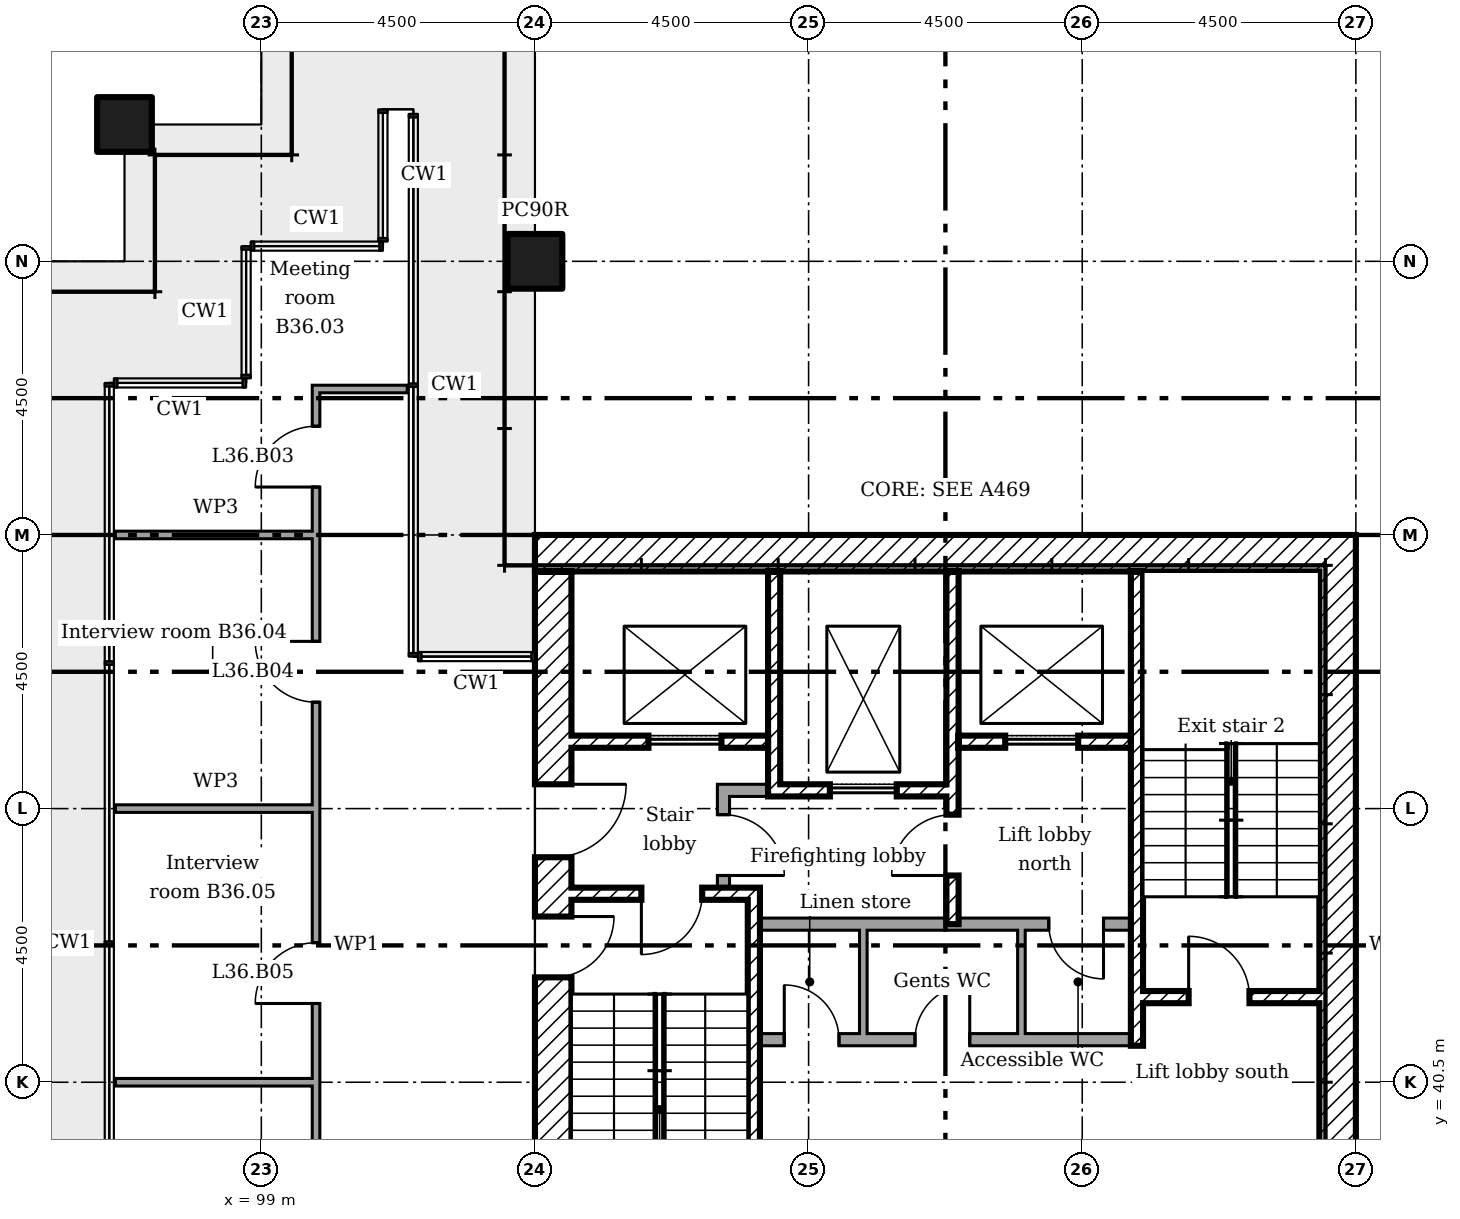
"""IFC4 building model, lengths in metres.
Left out: names, types, materials, properties, quantities, classifications, styles, units other than length and angle.
Written with IfcOpenShell. Run it as: python <this file> out.ifc"""

import sys

from ifc_helpers import new_model, si_unit, direction, frame, frame_2d, origin, origin_2d, place, context, subcontext, project, spatial, rectangle, extrude, element, fill, save


model = new_model("IFC4")
c1 = context("Model", 3, precision=1e-05, world=origin(), true_north=direction((0.0, 1.0)))
c2 = subcontext(c1, "Body", "Model", "MODEL_VIEW")
j1 = project(units=[si_unit("LENGTHUNIT", "METRE"), si_unit("PLANEANGLEUNIT", "RADIAN")], contexts=[c1])
p1 = place(None, origin())
s1 = spatial("IfcSite", under=j1, at=p1, CompositionType="ELEMENT")
p2 = place(p1, origin())
s2 = spatial("IfcBuilding", under=s1, at=p2, CompositionType="ELEMENT")
p3 = place(p2, frame((0.0, 0.0, 147.4)))
s3 = spatial("IfcBuildingStorey", under=s2, at=p3, CompositionType="ELEMENT", Elevation=147.4)
for number, where in (
    (1, (103.5, 54.0, 0.0)),
    (2, (96.75, 56.25, 0.0)),
):
    element("IfcColumn", number, at=place(p3, frame(where)), inside=s3, PredefinedType="COLUMN", context=c2, shape_type="SweptSolid", body=[
        extrude(rectangle(XDim=0.9, YDim=0.9, at=origin_2d()), origin(), (0.0, 0.0, 1.0), 3.6),
    ])
p4 = place(p3, frame((116.7, 36.0, 0.0), z_axis=(0.0, 0.0, 1.0), x_axis=(0.0, 1.0, 0.0)))
e3 = element("IfcWall", 3, at=p4, inside=s3, PredefinedType="SHEAR", context=c2, shape_type="SweptSolid", body=[
    extrude(rectangle(XDim=13.5, YDim=0.6, at=frame_2d((6.75, 0.0))), origin(), (0.0, 0.0, 1.0), 3.35),
])
p5 = place(p3, frame((103.5, 49.2, 0.0)))
e4 = element("IfcWall", 4, at=p5, inside=s3, PredefinedType="SHEAR", context=c2, shape_type="SweptSolid", body=[
    extrude(rectangle(XDim=12.9, YDim=0.6, at=frame_2d((6.45, 0.0))), origin(), (0.0, 0.0, 1.0), 3.35),
])
p6 = place(p3, frame((103.8, 36.6, 0.0), z_axis=(0.0, 0.0, 1.0), x_axis=(0.0, 1.0, 0.0)))
e5 = element("IfcWall", 5, at=p6, inside=s3, PredefinedType="SHEAR", context=c2, shape_type="SweptSolid", body=[
    extrude(rectangle(XDim=12.3, YDim=0.6, at=frame_2d((6.15, 0.0))), origin(), (0.0, 0.0, 1.0), 3.35),
])
p7 = place(p6, frame((7.6, 0.0, 0.0)))
e6 = element("IfcOpeningElement", 6, at=p7, cuts=e5, PredefinedType="OPENING", context=c2, shape_type="SweptSolid", body=[
    extrude(rectangle(XDim=1.2, YDim=2.1, at=frame_2d((0.6, 1.05))), frame((0.0, 0.31, 0.0), z_axis=(0.0, -1.0, 0.0), x_axis=(1.0, 0.0, 0.0)), (0.0, 0.0, 1.0), 0.62),
])
p8 = place(p6, frame((5.625, 0.0, 0.0)))
e7 = element("IfcOpeningElement", 7, at=p8, cuts=e5, PredefinedType="OPENING", context=c2, shape_type="SweptSolid", body=[
    extrude(rectangle(XDim=1.0, YDim=2.1, at=frame_2d((0.5, 1.05))), frame((0.0, 0.31, 0.0), z_axis=(0.0, -1.0, 0.0), x_axis=(1.0, 0.0, 0.0)), (0.0, 0.0, 1.0), 0.62),
])
p9 = place(p3, frame((107.433, 48.9, 0.0), z_axis=(0.0, 0.0, 1.0), x_axis=(0.0, -1.0, 0.0)))
e8 = element("IfcWall", 8, at=p9, inside=s3, PredefinedType="SHEAR", context=c2, shape_type="SweptSolid", body=[
    extrude(rectangle(XDim=3.7, YDim=0.2, at=frame_2d((1.85, 0.0))), origin(), (0.0, 0.0, 1.0), 3.35),
])
p10 = place(p3, frame((110.367, 48.9, 0.0), z_axis=(0.0, 0.0, 1.0), x_axis=(0.0, -1.0, 0.0)))
e9 = element("IfcWall", 9, at=p10, inside=s3, PredefinedType="SHEAR", context=c2, shape_type="SweptSolid", body=[
    extrude(rectangle(XDim=5.8, YDim=0.2, at=frame_2d((2.9, 0.0))), origin(), (0.0, 0.0, 1.0), 3.35),
])
p11 = place(p10, frame((4.0, 0.0, 0.0)))
e10 = element("IfcOpeningElement", 10, at=p11, cuts=e9, PredefinedType="OPENING", context=c2, shape_type="SweptSolid", body=[
    extrude(rectangle(XDim=1.0, YDim=2.1, at=frame_2d((0.5, 1.05))), frame((0.0, 0.11, 0.0), z_axis=(0.0, -1.0, 0.0), x_axis=(1.0, 0.0, 0.0)), (0.0, 0.0, 1.0), 0.22),
])
p12 = place(p3, frame((106.5, 45.3, 0.0)))
e11 = element("IfcWall", 11, at=p12, inside=s3, PredefinedType="PARTITIONING", context=c2, shape_type="SweptSolid", body=[
    extrude(rectangle(XDim=0.833, YDim=0.2, at=frame_2d((0.417, 0.0))), origin(), (0.0, 0.0, 1.0), 3.35),
])
p13 = place(p3, frame((106.6, 43.7, 0.0), z_axis=(0.0, 0.0, 1.0), x_axis=(0.0, 1.0, 0.0)))
e12 = element("IfcWall", 12, at=p13, inside=s3, PredefinedType="PARTITIONING", context=c2, shape_type="SweptSolid", body=[
    extrude(rectangle(XDim=1.5, YDim=0.2, at=frame_2d((0.75, 0.0))), origin(), (0.0, 0.0, 1.0), 3.35),
])
p14 = place(p13, frame((0.2, 0.0, 0.0)))
e13 = element("IfcOpeningElement", 13, at=p14, cuts=e12, PredefinedType="OPENING", context=c2, shape_type="SweptSolid", body=[
    extrude(rectangle(XDim=1.0, YDim=2.1, at=frame_2d((0.5, 1.05))), frame((0.0, 0.11, 0.0), z_axis=(0.0, -1.0, 0.0), x_axis=(1.0, 0.0, 0.0)), (0.0, 0.0, 1.0), 0.22),
])
p15 = place(p3, frame((104.1, 46.1, 0.0)))
e14 = element("IfcWall", 14, at=p15, inside=s3, PredefinedType="SHEAR", context=c2, shape_type="SweptSolid", body=[
    extrude(rectangle(XDim=3.233, YDim=0.2, at=frame_2d((1.617, 0.0))), origin(), (0.0, 0.0, 1.0), 3.35),
])
p16 = place(p15, frame((1.267, 0.0, 0.0)))
e15 = element("IfcOpeningElement", 15, at=p16, cuts=e14, PredefinedType="OPENING", context=c2, shape_type="SweptSolid", body=[
    extrude(rectangle(XDim=1.2, YDim=2.1, at=frame_2d((0.6, 1.05))), frame((0.0, 0.11, 0.0), z_axis=(0.0, -1.0, 0.0), x_axis=(1.0, 0.0, 0.0)), (0.0, 0.0, 1.0), 0.22),
])
p17 = place(p3, frame((110.467, 46.1, 0.0)))
e16 = element("IfcWall", 16, at=p17, inside=s3, PredefinedType="SHEAR", context=c2, shape_type="SweptSolid", body=[
    extrude(rectangle(XDim=2.833, YDim=0.2, at=frame_2d((1.417, 0.0))), origin(), (0.0, 0.0, 1.0), 3.35),
])
p18 = place(p17, frame((0.767, 0.0, 0.0)))
e17 = element("IfcOpeningElement", 17, at=p18, cuts=e16, PredefinedType="OPENING", context=c2, shape_type="SweptSolid", body=[
    extrude(rectangle(XDim=1.2, YDim=2.1, at=frame_2d((0.6, 1.05))), frame((0.0, 0.11, 0.0), z_axis=(0.0, -1.0, 0.0), x_axis=(1.0, 0.0, 0.0)), (0.0, 0.0, 1.0), 0.22),
])
p19 = place(p3, frame((107.533, 45.3, 0.0)))
e18 = element("IfcWall", 18, at=p19, inside=s3, PredefinedType="SHEAR", context=c2, shape_type="SweptSolid", body=[
    extrude(rectangle(XDim=2.733, YDim=0.2, at=frame_2d((1.367, 0.0))), origin(), (0.0, 0.0, 1.0), 3.35),
])
p20 = place(p19, frame((0.817, 0.0, 0.0)))
e19 = element("IfcOpeningElement", 19, at=p20, cuts=e18, PredefinedType="OPENING", context=c2, shape_type="SweptSolid", body=[
    extrude(rectangle(XDim=1.1, YDim=2.1, at=frame_2d((0.55, 1.05))), frame((0.0, 0.11, 0.0), z_axis=(0.0, -1.0, 0.0), x_axis=(1.0, 0.0, 0.0)), (0.0, 0.0, 1.0), 0.22),
])
p21 = place(p3, frame((107.1, 36.6, 0.0), z_axis=(0.0, 0.0, 1.0), x_axis=(0.0, 1.0, 0.0)))
e20 = element("IfcWall", 20, at=p21, inside=s3, PredefinedType="SHEAR", context=c2, shape_type="SweptSolid", body=[
    extrude(rectangle(XDim=7.1, YDim=0.2, at=frame_2d((3.55, 0.0))), origin(), (0.0, 0.0, 1.0), 3.35),
])
p22 = place(p3, frame((104.1, 43.6, 0.0)))
e21 = element("IfcWall", 21, at=p22, inside=s3, PredefinedType="SHEAR", context=c2, shape_type="SweptSolid", body=[
    extrude(rectangle(XDim=2.9, YDim=0.2, at=frame_2d((1.45, 0.0))), origin(), (0.0, 0.0, 1.0), 3.35),
])
p23 = place(p22, frame((1.15, 0.0, 0.0)))
e22 = element("IfcOpeningElement", 22, at=p23, cuts=e21, PredefinedType="OPENING", context=c2, shape_type="SweptSolid", body=[
    extrude(rectangle(XDim=1.0, YDim=2.1, at=frame_2d((0.5, 1.05))), frame((0.0, 0.11, 0.0), z_axis=(0.0, -1.0, 0.0), x_axis=(1.0, 0.0, 0.0)), (0.0, 0.0, 1.0), 0.22),
])
p24 = place(p3, frame((113.5, 41.9, 0.0)))
e23 = element("IfcWall", 23, at=p24, inside=s3, PredefinedType="SHEAR", context=c2, shape_type="SweptSolid", body=[
    extrude(rectangle(XDim=2.9, YDim=0.2, at=frame_2d((1.45, 0.0))), origin(), (0.0, 0.0, 1.0), 3.35),
])
p25 = place(p24, frame((0.75, 0.0, 0.0)))
e24 = element("IfcOpeningElement", 24, at=p25, cuts=e23, PredefinedType="OPENING", context=c2, shape_type="SweptSolid", body=[
    extrude(rectangle(XDim=1.0, YDim=2.1, at=frame_2d((0.5, 1.05))), frame((0.0, 0.11, 0.0), z_axis=(0.0, -1.0, 0.0), x_axis=(1.0, 0.0, 0.0)), (0.0, 0.0, 1.0), 0.22),
])
p26 = place(p3, frame((113.4, 41.1, 0.0), z_axis=(0.0, 0.0, 1.0), x_axis=(0.0, 1.0, 0.0)))
e25 = element("IfcWall", 25, at=p26, inside=s3, PredefinedType="SHEAR", context=c2, shape_type="SweptSolid", body=[
    extrude(rectangle(XDim=7.8, YDim=0.2, at=frame_2d((3.9, 0.0))), origin(), (0.0, 0.0, 1.0), 3.35),
])
p27 = place(p3, frame((107.2, 43.1, 0.0)))
e26 = element("IfcWall", 26, at=p27, inside=s3, PredefinedType="PARTITIONING", context=c2, shape_type="SweptSolid", body=[
    extrude(rectangle(XDim=6.1, YDim=0.2, at=frame_2d((3.05, 0.0))), origin(), (0.0, 0.0, 1.0), 3.35),
])
p28 = place(p27, frame((4.75, 0.0, 0.0)))
e27 = element("IfcOpeningElement", 27, at=p28, cuts=e26, PredefinedType="OPENING", context=c2, shape_type="SweptSolid", body=[
    extrude(rectangle(XDim=0.9, YDim=2.1, at=frame_2d((0.45, 1.05))), frame((0.0, 0.11, 0.0), z_axis=(0.0, -1.0, 0.0), x_axis=(1.0, 0.0, 0.0)), (0.0, 0.0, 1.0), 0.22),
])
p29 = place(p3, frame((107.2, 41.2, 0.0)))
e28 = element("IfcWall", 28, at=p29, inside=s3, PredefinedType="PARTITIONING", context=c2, shape_type="SweptSolid", body=[
    extrude(rectangle(XDim=6.1, YDim=0.2, at=frame_2d((3.05, 0.0))), origin(), (0.0, 0.0, 1.0), 3.35),
])
p30 = place(p29, frame((0.4, 0.0, 0.0)))
e29 = element("IfcOpeningElement", 29, at=p30, cuts=e28, PredefinedType="OPENING", context=c2, shape_type="SweptSolid", body=[
    extrude(rectangle(XDim=0.9, YDim=2.1, at=frame_2d((0.45, 1.05))), frame((0.0, 0.11, 0.0), z_axis=(0.0, -1.0, 0.0), x_axis=(1.0, 0.0, 0.0)), (0.0, 0.0, 1.0), 0.22),
])
p31 = place(p29, frame((2.55, 0.0, 0.0)))
e30 = element("IfcOpeningElement", 30, at=p31, cuts=e28, PredefinedType="OPENING", context=c2, shape_type="SweptSolid", body=[
    extrude(rectangle(XDim=0.9, YDim=2.1, at=frame_2d((0.45, 1.05))), frame((0.0, 0.11, 0.0), z_axis=(0.0, -1.0, 0.0), x_axis=(1.0, 0.0, 0.0)), (0.0, 0.0, 1.0), 0.22),
])
for number, where, z_axis, x_axis in (
    (31, (108.9, 41.3, 0.0), (0.0, 0.0, 1.0), (0.0, 1.0, 0.0)),
    (32, (111.5, 41.3, 0.0), (0.0, 0.0, 1.0), (0.0, 1.0, 0.0)),
):
    element("IfcWall", number, at=place(p3, frame(where, z_axis=z_axis, x_axis=x_axis)), inside=s3, PredefinedType="PARTITIONING", context=c2, shape_type="SweptSolid", body=[
        extrude(rectangle(XDim=1.7, YDim=0.125, at=frame_2d((0.85, 0.0))), origin(), (0.0, 0.0, 1.0), 3.35),
    ])
p32 = place(p3, frame((96.6, 40.5, 0.0)))
e33 = element("IfcWall", 33, at=p32, inside=s3, PredefinedType="PARTITIONING", context=c2, shape_type="SweptSolid", body=[
    extrude(rectangle(XDim=3.3, YDim=0.125, at=frame_2d((1.65, 0.0))), origin(), (0.0, 0.0, 1.0), 2.851),
])
for number, where in (
    (34, (96.6, 45.0, 0.0)),
    (35, (96.6, 49.5, 0.0)),
):
    element("IfcWall", number, at=place(p3, frame(where)), inside=s3, PredefinedType="MOVABLE", context=c2, shape_type="SweptSolid", body=[
        extrude(rectangle(XDim=3.3, YDim=0.125, at=frame_2d((1.65, 0.0))), origin(), (0.0, 0.0, 1.0), 2.851),
    ])
p33 = place(p3, frame((99.837, 51.9, 0.0)))
e36 = element("IfcWall", 36, at=p33, inside=s3, PredefinedType="PARTITIONING", context=c2, shape_type="SweptSolid", body=[
    extrude(rectangle(XDim=1.562, YDim=0.125, at=frame_2d((0.781, 0.0))), origin(), (0.0, 0.0, 1.0), 3.45),
])
p34 = place(p3, frame((99.9, 33.663, 0.0), z_axis=(0.0, 0.0, 1.0), x_axis=(0.0, 1.0, 0.0)))
e37 = element("IfcWall", 37, at=p34, inside=s3, PredefinedType="PARTITIONING", context=c2, shape_type="SweptSolid", body=[
    extrude(rectangle(XDim=18.175, YDim=0.125, at=frame_2d((9.087, 0.0))), origin(), (0.0, 0.0, 1.0), 3.45),
])
p35 = place(p34, frame((16.625, 0.0, 0.0)))
e38 = element("IfcOpeningElement", 38, at=p35, cuts=e37, PredefinedType="OPENING", context=c2, shape_type="SweptSolid", body=[
    extrude(rectangle(XDim=1.0, YDim=2.1, at=frame_2d((0.5, 1.05))), frame((0.0, 0.073, 0.0), z_axis=(0.0, -1.0, 0.0), x_axis=(1.0, 0.0, 0.0)), (0.0, 0.0, 1.0), 0.145),
])
p36 = place(p34, frame((13.087, 0.0, 0.0)))
e39 = element("IfcOpeningElement", 39, at=p36, cuts=e37, PredefinedType="OPENING", context=c2, shape_type="SweptSolid", body=[
    extrude(rectangle(XDim=1.0, YDim=2.1, at=frame_2d((0.5, 1.05))), frame((0.0, 0.073, 0.0), z_axis=(0.0, -1.0, 0.0), x_axis=(1.0, 0.0, 0.0)), (0.0, 0.0, 1.0), 0.145),
])
p37 = place(p34, frame((8.133, 0.0, 0.0)))
e40 = element("IfcOpeningElement", 40, at=p37, cuts=e37, PredefinedType="OPENING", context=c2, shape_type="SweptSolid", body=[
    extrude(rectangle(XDim=1.0, YDim=2.1, at=frame_2d((0.5, 1.05))), frame((0.0, 0.073, 0.0), z_axis=(0.0, -1.0, 0.0), x_axis=(1.0, 0.0, 0.0)), (0.0, 0.0, 1.0), 0.145),
])
p38 = place(p7, frame((1.2, 0.0, 0.0), x_axis=(-1.0, 0.0, 0.0)))
e41 = element("IfcDoor", 41, at=p38, inside=s3, OperationType="SINGLE_SWING_RIGHT", PredefinedType="DOOR", context=c2, shape_type="SweptSolid", body=[
    extrude(rectangle(XDim=1.2, YDim=2.1, at=frame_2d((0.6, 1.05))), frame((0.0, 0.025, 0.0), z_axis=(0.0, -1.0, 0.0), x_axis=(1.0, 0.0, 0.0)), (0.0, 0.0, 1.0), 0.05),
])
fill(e6, e41)
p39 = place(p23, frame((1.0, 0.0, 0.0), x_axis=(-1.0, 0.0, 0.0)))
e42 = element("IfcDoor", 42, at=p39, inside=s3, OperationType="SINGLE_SWING_LEFT", PredefinedType="DOOR", context=c2, shape_type="SweptSolid", body=[
    extrude(rectangle(XDim=1.0, YDim=2.1, at=frame_2d((0.5, 1.05))), frame((0.0, 0.025, 0.0), z_axis=(0.0, -1.0, 0.0), x_axis=(1.0, 0.0, 0.0)), (0.0, 0.0, 1.0), 0.05),
])
fill(e22, e42)
p40 = place(p8, frame((1.0, 0.0, 0.0), x_axis=(-1.0, 0.0, 0.0)))
e43 = element("IfcDoor", 43, at=p40, inside=s3, OperationType="SINGLE_SWING_RIGHT", PredefinedType="DOOR", context=c2, shape_type="SweptSolid", body=[
    extrude(rectangle(XDim=1.0, YDim=2.1, at=frame_2d((0.5, 1.05))), frame((0.0, 0.025, 0.0), z_axis=(0.0, -1.0, 0.0), x_axis=(1.0, 0.0, 0.0)), (0.0, 0.0, 1.0), 0.05),
])
fill(e7, e43)
p41 = place(p25, origin())
e44 = element("IfcDoor", 44, at=p41, inside=s3, OperationType="SINGLE_SWING_RIGHT", PredefinedType="DOOR", context=c2, shape_type="SweptSolid", body=[
    extrude(rectangle(XDim=1.0, YDim=2.1, at=frame_2d((0.5, 1.05))), frame((0.0, 0.025, 0.0), z_axis=(0.0, -1.0, 0.0), x_axis=(1.0, 0.0, 0.0)), (0.0, 0.0, 1.0), 0.05),
])
fill(e24, e44)
p42 = place(p11, frame((1.0, 0.0, 0.0), x_axis=(-1.0, 0.0, 0.0)))
e45 = element("IfcDoor", 45, at=p42, inside=s3, OperationType="SINGLE_SWING_RIGHT", PredefinedType="DOOR", context=c2, shape_type="SweptSolid", body=[
    extrude(rectangle(XDim=1.0, YDim=2.1, at=frame_2d((0.5, 1.05))), frame((0.0, 0.025, 0.0), z_axis=(0.0, -1.0, 0.0), x_axis=(1.0, 0.0, 0.0)), (0.0, 0.0, 1.0), 0.05),
])
fill(e10, e45)
p43 = place(p14, frame((1.0, 0.0, 0.0), x_axis=(-1.0, 0.0, 0.0)))
e46 = element("IfcDoor", 46, at=p43, inside=s3, OperationType="SINGLE_SWING_LEFT", PredefinedType="DOOR", context=c2, shape_type="SweptSolid", body=[
    extrude(rectangle(XDim=1.0, YDim=2.1, at=frame_2d((0.5, 1.05))), frame((0.0, 0.025, 0.0), z_axis=(0.0, -1.0, 0.0), x_axis=(1.0, 0.0, 0.0)), (0.0, 0.0, 1.0), 0.05),
])
fill(e13, e46)
p44 = place(p30, origin())
e47 = element("IfcDoor", 47, at=p44, inside=s3, OperationType="SINGLE_SWING_RIGHT", PredefinedType="DOOR", context=c2, shape_type="SweptSolid", body=[
    extrude(rectangle(XDim=0.9, YDim=2.1, at=frame_2d((0.45, 1.05))), frame((0.0, 0.025, 0.0), z_axis=(0.0, -1.0, 0.0), x_axis=(1.0, 0.0, 0.0)), (0.0, 0.0, 1.0), 0.05),
])
fill(e29, e47)
p45 = place(p31, origin())
e48 = element("IfcDoor", 48, at=p45, inside=s3, OperationType="SINGLE_SWING_LEFT", PredefinedType="DOOR", context=c2, shape_type="SweptSolid", body=[
    extrude(rectangle(XDim=0.9, YDim=2.1, at=frame_2d((0.45, 1.05))), frame((0.0, 0.025, 0.0), z_axis=(0.0, -1.0, 0.0), x_axis=(1.0, 0.0, 0.0)), (0.0, 0.0, 1.0), 0.05),
])
fill(e30, e48)
p46 = place(p28, frame((0.9, 0.0, 0.0), x_axis=(-1.0, 0.0, 0.0)))
e49 = element("IfcDoor", 49, at=p46, inside=s3, OperationType="SINGLE_SWING_RIGHT", PredefinedType="DOOR", context=c2, shape_type="SweptSolid", body=[
    extrude(rectangle(XDim=0.9, YDim=2.1, at=frame_2d((0.45, 1.05))), frame((0.0, 0.025, 0.0), z_axis=(0.0, -1.0, 0.0), x_axis=(1.0, 0.0, 0.0)), (0.0, 0.0, 1.0), 0.05),
])
fill(e27, e49)
p47 = place(p20, origin())
e50 = element("IfcDoor", 50, at=p47, inside=s3, OperationType="SLIDING_TO_LEFT", PredefinedType="DOOR", context=c2, shape_type="SweptSolid", body=[
    extrude(rectangle(XDim=1.1, YDim=2.1, at=frame_2d((0.55, 1.05))), frame((0.0, 0.025, 0.0), z_axis=(0.0, -1.0, 0.0), x_axis=(1.0, 0.0, 0.0)), (0.0, 0.0, 1.0), 0.05),
])
fill(e19, e50)
p48 = place(p16, origin())
e51 = element("IfcDoor", 51, at=p48, inside=s3, OperationType="SLIDING_TO_LEFT", PredefinedType="DOOR", context=c2, shape_type="SweptSolid", body=[
    extrude(rectangle(XDim=1.2, YDim=2.1, at=frame_2d((0.6, 1.05))), frame((0.0, 0.025, 0.0), z_axis=(0.0, -1.0, 0.0), x_axis=(1.0, 0.0, 0.0)), (0.0, 0.0, 1.0), 0.05),
])
fill(e15, e51)
p49 = place(p18, origin())
e52 = element("IfcDoor", 52, at=p49, inside=s3, OperationType="SLIDING_TO_LEFT", PredefinedType="DOOR", context=c2, shape_type="SweptSolid", body=[
    extrude(rectangle(XDim=1.2, YDim=2.1, at=frame_2d((0.6, 1.05))), frame((0.0, 0.025, 0.0), z_axis=(0.0, -1.0, 0.0), x_axis=(1.0, 0.0, 0.0)), (0.0, 0.0, 1.0), 0.05),
])
fill(e17, e52)
p50 = place(p35, origin())
e53 = element("IfcDoor", 53, at=p50, inside=s3, OperationType="SINGLE_SWING_RIGHT", PredefinedType="DOOR", context=c2, shape_type="SweptSolid", body=[
    extrude(rectangle(XDim=1.0, YDim=2.1, at=frame_2d((0.5, 1.05))), frame((0.0, 0.025, 0.0), z_axis=(0.0, -1.0, 0.0), x_axis=(1.0, 0.0, 0.0)), (0.0, 0.0, 1.0), 0.05),
])
fill(e38, e53)
p51 = place(p36, origin())
e54 = element("IfcDoor", 54, at=p51, inside=s3, OperationType="SINGLE_SWING_LEFT", PredefinedType="DOOR", context=c2, shape_type="SweptSolid", body=[
    extrude(rectangle(XDim=1.0, YDim=2.1, at=frame_2d((0.5, 1.05))), frame((0.0, 0.025, 0.0), z_axis=(0.0, -1.0, 0.0), x_axis=(1.0, 0.0, 0.0)), (0.0, 0.0, 1.0), 0.05),
])
fill(e39, e54)
p52 = place(p37, origin())
e55 = element("IfcDoor", 55, at=p52, inside=s3, OperationType="SINGLE_SWING_RIGHT", PredefinedType="DOOR", context=c2, shape_type="SweptSolid", body=[
    extrude(rectangle(XDim=1.0, YDim=2.1, at=frame_2d((0.5, 1.05))), frame((0.0, 0.025, 0.0), z_axis=(0.0, -1.0, 0.0), x_axis=(1.0, 0.0, 0.0)), (0.0, 0.0, 1.0), 0.05),
])
fill(e40, e55)
save(model, sys.argv[1])
